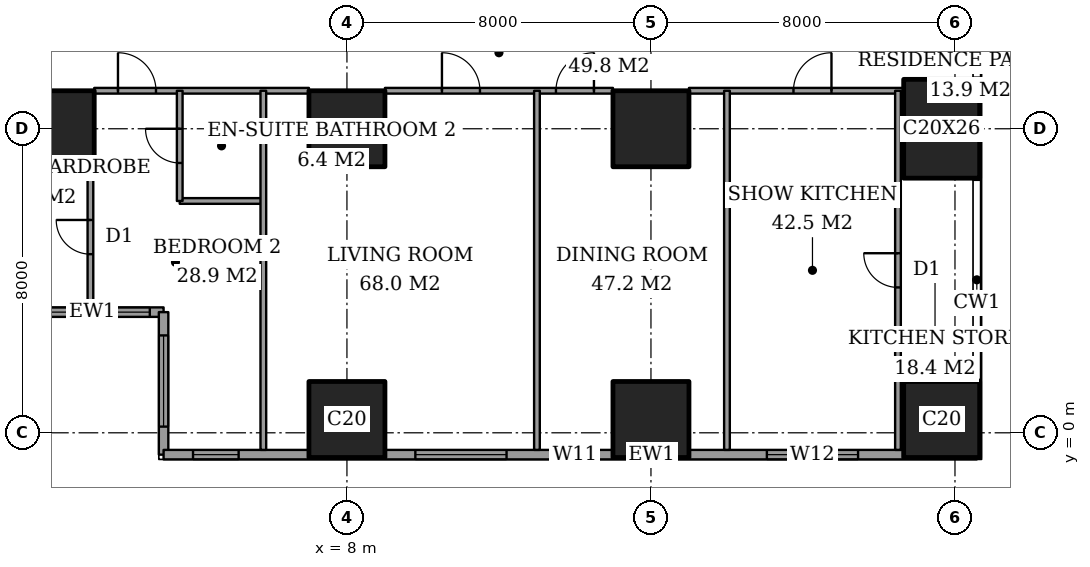
"""IFC4 building model, lengths in metres.
Left out: names, types, materials, properties, quantities, classifications, styles, units other than length and angle.
Written with IfcOpenShell. Run it as: python <this file> out.ifc"""

import sys

from ifc_helpers import new_model, si_unit, direction, frame, frame_2d, origin, origin_2d, place, context, subcontext, project, spatial, rectangle, extrude, element, fill, save


model = new_model("IFC4")
c1 = context("Model", 3, precision=1e-05, world=origin(), true_north=direction((0.0, 1.0)))
c2 = subcontext(c1, "Body", "Model", "MODEL_VIEW")
j1 = project(units=[si_unit("LENGTHUNIT", "METRE"), si_unit("PLANEANGLEUNIT", "RADIAN")], contexts=[c1])
p1 = place(None, origin())
s1 = spatial("IfcSite", under=j1, at=p1, CompositionType="ELEMENT")
p2 = place(p1, origin())
s2 = spatial("IfcBuilding", under=s1, at=p2, CompositionType="ELEMENT")
p3 = place(p2, frame((0.0, 0.0, 150.2)))
s3 = spatial("IfcBuildingStorey", under=s2, at=p3, CompositionType="ELEMENT", Elevation=150.2)
for number, where, z_axis, x_axis in (
    (1, (0.35, 8.0, 0.0), (0.0, 0.0, 1.0), (1.0, 0.0, 0.0)),
    (2, (8.0, 0.35, 0.0), (0.0, 0.0, 1.0), (1.0, 0.0, 0.0)),
    (3, (8.0, 8.0, 0.0), (0.0, 0.0, 1.0), (1.0, 0.0, 0.0)),
    (4, (16.0, 0.35, 0.0), (0.0, 0.0, 1.0), (1.0, 0.0, 0.0)),
    (5, (16.0, 8.0, 0.0), (0.0, 0.0, 1.0), (1.0, 0.0, 0.0)),
    (6, (23.65, 0.35, 0.0), (0.0, 0.0, 1.0), (1.0, 0.0, 0.0)),
):
    element("IfcColumn", number, at=place(p3, frame(where, z_axis=z_axis, x_axis=x_axis)), inside=s3, PredefinedType="COLUMN", context=c2, shape_type="SweptSolid", body=[
        extrude(rectangle(XDim=2.0, YDim=2.0, at=origin_2d()), origin(), (0.0, 0.0, 1.0), 3.6),
    ])
p4 = place(p3, frame((23.65, 8.0, 0.0), z_axis=(0.0, 0.0, 1.0), x_axis=(1.0, 0.0, 0.0)))
e7 = element("IfcColumn", 7, at=p4, inside=s3, PredefinedType="COLUMN", context=c2, shape_type="SweptSolid", body=[
    extrude(rectangle(XDim=2.0, YDim=2.6, at=origin_2d()), origin(), (0.0, 0.0, 1.0), 3.6),
])
p5 = place(p3, frame((-0.575, 3.175, 0.0), z_axis=(0.0, 0.0, 1.0), x_axis=(1.0, 0.0, 0.0)))
e8 = element("IfcWall", 8, at=p5, inside=s3, PredefinedType="SOLIDWALL", context=c2, shape_type="SweptSolid", body=[
    extrude(rectangle(XDim=3.75, YDim=0.25, at=frame_2d((1.875, 0.0))), origin(), (0.0, 0.0, 1.0), 3.6),
])
p6 = place(p5, frame((0.45, 0.0, 0.4)))
e9 = element("IfcOpeningElement", 9, at=p6, cuts=e8, PredefinedType="OPENING", context=c2, shape_type="SweptSolid", body=[
    extrude(rectangle(XDim=1.2, YDim=2.2, at=frame_2d((0.6, 1.1))), frame((0.0, 0.135, 0.0), z_axis=(0.0, -1.0, 0.0), x_axis=(1.0, 0.0, 0.0)), (0.0, 0.0, 1.0), 0.27),
])
p7 = place(p5, frame((2.188, 0.0, 0.4)))
e10 = element("IfcOpeningElement", 10, at=p7, cuts=e8, PredefinedType="OPENING", context=c2, shape_type="SweptSolid", body=[
    extrude(rectangle(XDim=1.2, YDim=2.2, at=frame_2d((0.6, 1.1))), frame((0.0, 0.135, 0.0), z_axis=(0.0, -1.0, 0.0), x_axis=(1.0, 0.0, 0.0)), (0.0, 0.0, 1.0), 0.27),
])
p8 = place(p3, frame((3.175, 3.175, 0.0), z_axis=(0.0, 0.0, 1.0), x_axis=(0.0, -1.0, 0.0)))
e11 = element("IfcWall", 11, at=p8, inside=s3, PredefinedType="SOLIDWALL", context=c2, shape_type="SweptSolid", body=[
    extrude(rectangle(XDim=3.75, YDim=0.25, at=frame_2d((1.875, 0.0))), origin(), (0.0, 0.0, 1.0), 3.6),
])
p9 = place(p8, frame((0.613, 0.0, 0.4)))
e12 = element("IfcOpeningElement", 12, at=p9, cuts=e11, PredefinedType="OPENING", context=c2, shape_type="SweptSolid", body=[
    extrude(rectangle(XDim=2.4, YDim=2.2, at=frame_2d((1.2, 1.1))), frame((0.0, 0.135, 0.0), z_axis=(0.0, -1.0, 0.0), x_axis=(1.0, 0.0, 0.0)), (0.0, 0.0, 1.0), 0.27),
])
p10 = place(p3, frame((3.175, -0.575, 0.0), z_axis=(0.0, 0.0, 1.0), x_axis=(1.0, 0.0, 0.0)))
e13 = element("IfcWall", 13, at=p10, inside=s3, PredefinedType="SOLIDWALL", context=c2, shape_type="SweptSolid", body=[
    extrude(rectangle(XDim=21.4, YDim=0.25, at=frame_2d((10.7, 0.0))), origin(), (0.0, 0.0, 1.0), 3.6),
])
p11 = place(p10, frame((0.775, 0.0, 0.4)))
e14 = element("IfcOpeningElement", 14, at=p11, cuts=e13, PredefinedType="OPENING", context=c2, shape_type="SweptSolid", body=[
    extrude(rectangle(XDim=1.2, YDim=2.2, at=frame_2d((0.6, 1.1))), frame((0.0, 0.135, 0.0), z_axis=(0.0, -1.0, 0.0), x_axis=(1.0, 0.0, 0.0)), (0.0, 0.0, 1.0), 0.27),
])
p12 = place(p10, frame((6.625, 0.0, 0.4)))
e15 = element("IfcOpeningElement", 15, at=p12, cuts=e13, PredefinedType="OPENING", context=c2, shape_type="SweptSolid", body=[
    extrude(rectangle(XDim=2.4, YDim=2.2, at=frame_2d((1.2, 1.1))), frame((0.0, 0.135, 0.0), z_axis=(0.0, -1.0, 0.0), x_axis=(1.0, 0.0, 0.0)), (0.0, 0.0, 1.0), 0.27),
])
p13 = place(p10, frame((10.225, 0.0, 0.4)))
e16 = element("IfcOpeningElement", 16, at=p13, cuts=e13, PredefinedType="OPENING", context=c2, shape_type="SweptSolid", body=[
    extrude(rectangle(XDim=1.2, YDim=2.2, at=frame_2d((0.6, 1.1))), frame((0.0, 0.135, 0.0), z_axis=(0.0, -1.0, 0.0), x_axis=(1.0, 0.0, 0.0)), (0.0, 0.0, 1.0), 0.27),
])
p14 = place(p10, frame((15.875, 0.0, 0.4)))
e17 = element("IfcOpeningElement", 17, at=p14, cuts=e13, PredefinedType="OPENING", context=c2, shape_type="SweptSolid", body=[
    extrude(rectangle(XDim=2.4, YDim=2.2, at=frame_2d((1.2, 1.1))), frame((0.0, 0.135, 0.0), z_axis=(0.0, -1.0, 0.0), x_axis=(1.0, 0.0, 0.0)), (0.0, 0.0, 1.0), 0.27),
])
p15 = place(p3, frame((3.6, 6.1, 0.0), z_axis=(0.0, 0.0, 1.0), x_axis=(1.0, 0.0, 0.0)))
e18 = element("IfcWall", 18, at=p15, inside=s3, PredefinedType="PARTITIONING", context=c2, shape_type="SweptSolid", body=[
    extrude(rectangle(XDim=2.2, YDim=0.15, at=frame_2d((1.1, 0.0))), origin(), (0.0, 0.0, 1.0), 3.35),
])
p16 = place(p3, frame((1.35, 9.0, 0.0), z_axis=(0.0, 0.0, 1.0), x_axis=(1.0, 0.0, 0.0)))
e19 = element("IfcWall", 19, at=p16, inside=s3, PredefinedType="PARTITIONING", context=c2, shape_type="SweptSolid", body=[
    extrude(rectangle(XDim=5.65, YDim=0.15, at=frame_2d((2.825, 0.0))), origin(), (0.0, 0.0, 1.0), 3.35),
])
p17 = place(p16, frame((0.625, 0.0, 0.0)))
e20 = element("IfcOpeningElement", 20, at=p17, cuts=e19, PredefinedType="OPENING", context=c2, shape_type="SweptSolid", body=[
    extrude(rectangle(XDim=1.0, YDim=2.1, at=frame_2d((0.5, 1.05))), frame((0.0, 0.085, 0.0), z_axis=(0.0, -1.0, 0.0), x_axis=(1.0, 0.0, 0.0)), (0.0, 0.0, 1.0), 0.17),
])
p18 = place(p3, frame((9.0, 9.0, 0.0), z_axis=(0.0, 0.0, 1.0), x_axis=(1.0, 0.0, 0.0)))
e21 = element("IfcWall", 21, at=p18, inside=s3, PredefinedType="PARTITIONING", context=c2, shape_type="SweptSolid", body=[
    extrude(rectangle(XDim=6.0, YDim=0.15, at=frame_2d((3.0, 0.0))), origin(), (0.0, 0.0, 1.0), 3.35),
])
p19 = place(p18, frame((1.5, 0.0, 0.0)))
e22 = element("IfcOpeningElement", 22, at=p19, cuts=e21, PredefinedType="OPENING", context=c2, shape_type="SweptSolid", body=[
    extrude(rectangle(XDim=1.0, YDim=2.1, at=frame_2d((0.5, 1.05))), frame((0.0, 0.085, 0.0), z_axis=(0.0, -1.0, 0.0), x_axis=(1.0, 0.0, 0.0)), (0.0, 0.0, 1.0), 0.17),
])
p20 = place(p18, frame((4.5, 0.0, 0.0)))
e23 = element("IfcOpeningElement", 23, at=p20, cuts=e21, PredefinedType="OPENING", context=c2, shape_type="SweptSolid", body=[
    extrude(rectangle(XDim=1.0, YDim=2.1, at=frame_2d((0.5, 1.05))), frame((0.0, 0.085, 0.0), z_axis=(0.0, -1.0, 0.0), x_axis=(1.0, 0.0, 0.0)), (0.0, 0.0, 1.0), 0.17),
])
p21 = place(p3, frame((17.0, 9.0, 0.0), z_axis=(0.0, 0.0, 1.0), x_axis=(1.0, 0.0, 0.0)))
e24 = element("IfcWall", 24, at=p21, inside=s3, PredefinedType="PARTITIONING", context=c2, shape_type="SweptSolid", body=[
    extrude(rectangle(XDim=5.65, YDim=0.15, at=frame_2d((2.825, 0.0))), origin(), (0.0, 0.0, 1.0), 3.35),
])
p22 = place(p21, frame((2.75, 0.0, 0.0)))
e25 = element("IfcOpeningElement", 25, at=p22, cuts=e24, PredefinedType="OPENING", context=c2, shape_type="SweptSolid", body=[
    extrude(rectangle(XDim=1.0, YDim=2.1, at=frame_2d((0.5, 1.05))), frame((0.0, 0.085, 0.0), z_axis=(0.0, -1.0, 0.0), x_axis=(1.0, 0.0, 0.0)), (0.0, 0.0, 1.0), 0.17),
])
p23 = place(p3, frame((1.25, 3.3, 0.0), z_axis=(0.0, 0.0, 1.0), x_axis=(0.0, 1.0, 0.0)))
e26 = element("IfcWall", 26, at=p23, inside=s3, PredefinedType="PARTITIONING", context=c2, shape_type="SweptSolid", body=[
    extrude(rectangle(XDim=3.7, YDim=0.15, at=frame_2d((1.85, 0.0))), origin(), (0.0, 0.0, 1.0), 3.35),
])
p24 = place(p23, frame((1.4, 0.0, 0.0)))
e27 = element("IfcOpeningElement", 27, at=p24, cuts=e26, PredefinedType="OPENING", context=c2, shape_type="SweptSolid", body=[
    extrude(rectangle(XDim=0.9, YDim=2.1, at=frame_2d((0.45, 1.05))), frame((0.0, 0.085, 0.0), z_axis=(0.0, -1.0, 0.0), x_axis=(1.0, 0.0, 0.0)), (0.0, 0.0, 1.0), 0.17),
])
p25 = place(p3, frame((3.6, 6.1, 0.0), z_axis=(0.0, 0.0, 1.0), x_axis=(0.0, 1.0, 0.0)))
e28 = element("IfcWall", 28, at=p25, inside=s3, PredefinedType="PARTITIONING", context=c2, shape_type="SweptSolid", body=[
    extrude(rectangle(XDim=2.9, YDim=0.15, at=frame_2d((1.45, 0.0))), origin(), (0.0, 0.0, 1.0), 3.35),
])
p26 = place(p25, frame((1.0, 0.0, 0.0)))
e29 = element("IfcOpeningElement", 29, at=p26, cuts=e28, PredefinedType="OPENING", context=c2, shape_type="SweptSolid", body=[
    extrude(rectangle(XDim=0.9, YDim=2.1, at=frame_2d((0.45, 1.05))), frame((0.0, 0.085, 0.0), z_axis=(0.0, -1.0, 0.0), x_axis=(1.0, 0.0, 0.0)), (0.0, 0.0, 1.0), 0.17),
])
for number, where, z_axis, x_axis in (
    (30, (5.8, -0.45, 0.0), (0.0, 0.0, 1.0), (0.0, 1.0, 0.0)),
    (31, (13.0, -0.45, 0.0), (0.0, 0.0, 1.0), (0.0, 1.0, 0.0)),
    (32, (18.0, -0.45, 0.0), (0.0, 0.0, 1.0), (0.0, 1.0, 0.0)),
):
    element("IfcWall", number, at=place(p3, frame(where, z_axis=z_axis, x_axis=x_axis)), inside=s3, PredefinedType="PARTITIONING", context=c2, shape_type="SweptSolid", body=[
        extrude(rectangle(XDim=9.45, YDim=0.15, at=frame_2d((4.725, 0.0))), origin(), (0.0, 0.0, 1.0), 3.35),
    ])
p27 = place(p3, frame((22.5, -0.45, 0.0), z_axis=(0.0, 0.0, 1.0), x_axis=(0.0, 1.0, 0.0)))
e33 = element("IfcWall", 33, at=p27, inside=s3, PredefinedType="PARTITIONING", context=c2, shape_type="SweptSolid", body=[
    extrude(rectangle(XDim=9.45, YDim=0.15, at=frame_2d((4.725, 0.0))), origin(), (0.0, 0.0, 1.0), 3.35),
])
p28 = place(p27, frame((4.275, 0.0, 0.0)))
e34 = element("IfcOpeningElement", 34, at=p28, cuts=e33, PredefinedType="OPENING", context=c2, shape_type="SweptSolid", body=[
    extrude(rectangle(XDim=0.9, YDim=2.1, at=frame_2d((0.45, 1.05))), frame((0.0, 0.085, 0.0), z_axis=(0.0, -1.0, 0.0), x_axis=(1.0, 0.0, 0.0)), (0.0, 0.0, 1.0), 0.17),
])
p29 = place(p6, origin())
e35 = element("IfcWindow", 35, at=p29, inside=s3, PartitioningType="SINGLE_PANEL", PredefinedType="WINDOW", context=c2, shape_type="SweptSolid", body=[
    extrude(rectangle(XDim=1.2, YDim=2.2, at=frame_2d((0.6, 1.1))), frame((0.0, 0.03, 0.0), z_axis=(0.0, -1.0, 0.0), x_axis=(1.0, 0.0, 0.0)), (0.0, 0.0, 1.0), 0.06),
])
fill(e9, e35)
p30 = place(p7, origin())
e36 = element("IfcWindow", 36, at=p30, inside=s3, PartitioningType="SINGLE_PANEL", PredefinedType="WINDOW", context=c2, shape_type="SweptSolid", body=[
    extrude(rectangle(XDim=1.2, YDim=2.2, at=frame_2d((0.6, 1.1))), frame((0.0, 0.03, 0.0), z_axis=(0.0, -1.0, 0.0), x_axis=(1.0, 0.0, 0.0)), (0.0, 0.0, 1.0), 0.06),
])
fill(e10, e36)
p31 = place(p9, origin())
e37 = element("IfcWindow", 37, at=p31, inside=s3, PartitioningType="SINGLE_PANEL", PredefinedType="WINDOW", context=c2, shape_type="SweptSolid", body=[
    extrude(rectangle(XDim=2.4, YDim=2.2, at=frame_2d((1.2, 1.1))), frame((0.0, 0.03, 0.0), z_axis=(0.0, -1.0, 0.0), x_axis=(1.0, 0.0, 0.0)), (0.0, 0.0, 1.0), 0.06),
])
fill(e12, e37)
p32 = place(p11, origin())
e38 = element("IfcWindow", 38, at=p32, inside=s3, PartitioningType="SINGLE_PANEL", PredefinedType="WINDOW", context=c2, shape_type="SweptSolid", body=[
    extrude(rectangle(XDim=1.2, YDim=2.2, at=frame_2d((0.6, 1.1))), frame((0.0, 0.03, 0.0), z_axis=(0.0, -1.0, 0.0), x_axis=(1.0, 0.0, 0.0)), (0.0, 0.0, 1.0), 0.06),
])
fill(e14, e38)
p33 = place(p12, origin())
e39 = element("IfcWindow", 39, at=p33, inside=s3, PartitioningType="SINGLE_PANEL", PredefinedType="WINDOW", context=c2, shape_type="SweptSolid", body=[
    extrude(rectangle(XDim=2.4, YDim=2.2, at=frame_2d((1.2, 1.1))), frame((0.0, 0.03, 0.0), z_axis=(0.0, -1.0, 0.0), x_axis=(1.0, 0.0, 0.0)), (0.0, 0.0, 1.0), 0.06),
])
fill(e15, e39)
p34 = place(p13, origin())
e40 = element("IfcWindow", 40, at=p34, inside=s3, PartitioningType="SINGLE_PANEL", PredefinedType="WINDOW", context=c2, shape_type="SweptSolid", body=[
    extrude(rectangle(XDim=1.2, YDim=2.2, at=frame_2d((0.6, 1.1))), frame((0.0, 0.03, 0.0), z_axis=(0.0, -1.0, 0.0), x_axis=(1.0, 0.0, 0.0)), (0.0, 0.0, 1.0), 0.06),
])
fill(e16, e40)
p35 = place(p14, origin())
e41 = element("IfcWindow", 41, at=p35, inside=s3, PartitioningType="SINGLE_PANEL", PredefinedType="WINDOW", context=c2, shape_type="SweptSolid", body=[
    extrude(rectangle(XDim=2.4, YDim=2.2, at=frame_2d((1.2, 1.1))), frame((0.0, 0.03, 0.0), z_axis=(0.0, -1.0, 0.0), x_axis=(1.0, 0.0, 0.0)), (0.0, 0.0, 1.0), 0.06),
])
fill(e17, e41)
p36 = place(p24, origin())
e42 = element("IfcDoor", 42, at=p36, inside=s3, OperationType="SINGLE_SWING_LEFT", PredefinedType="DOOR", context=c2, shape_type="SweptSolid", body=[
    extrude(rectangle(XDim=0.9, YDim=2.1, at=frame_2d((0.45, 1.05))), frame((0.0, 0.025, 0.0), z_axis=(0.0, -1.0, 0.0), x_axis=(1.0, 0.0, 0.0)), (0.0, 0.0, 1.0), 0.05),
])
fill(e27, e42)
p37 = place(p26, origin())
e43 = element("IfcDoor", 43, at=p37, inside=s3, OperationType="SINGLE_SWING_LEFT", PredefinedType="DOOR", context=c2, shape_type="SweptSolid", body=[
    extrude(rectangle(XDim=0.9, YDim=2.1, at=frame_2d((0.45, 1.05))), frame((0.0, 0.025, 0.0), z_axis=(0.0, -1.0, 0.0), x_axis=(1.0, 0.0, 0.0)), (0.0, 0.0, 1.0), 0.05),
])
fill(e29, e43)
p38 = place(p17, origin())
e44 = element("IfcDoor", 44, at=p38, inside=s3, OperationType="SINGLE_SWING_RIGHT", PredefinedType="DOOR", context=c2, shape_type="SweptSolid", body=[
    extrude(rectangle(XDim=1.0, YDim=2.1, at=frame_2d((0.5, 1.05))), frame((0.0, 0.025, 0.0), z_axis=(0.0, -1.0, 0.0), x_axis=(1.0, 0.0, 0.0)), (0.0, 0.0, 1.0), 0.05),
])
fill(e20, e44)
p39 = place(p19, origin())
e45 = element("IfcDoor", 45, at=p39, inside=s3, OperationType="SINGLE_SWING_RIGHT", PredefinedType="DOOR", context=c2, shape_type="SweptSolid", body=[
    extrude(rectangle(XDim=1.0, YDim=2.1, at=frame_2d((0.5, 1.05))), frame((0.0, 0.025, 0.0), z_axis=(0.0, -1.0, 0.0), x_axis=(1.0, 0.0, 0.0)), (0.0, 0.0, 1.0), 0.05),
])
fill(e22, e45)
p40 = place(p20, origin())
e46 = element("IfcDoor", 46, at=p40, inside=s3, OperationType="SINGLE_SWING_LEFT", PredefinedType="DOOR", context=c2, shape_type="SweptSolid", body=[
    extrude(rectangle(XDim=1.0, YDim=2.1, at=frame_2d((0.5, 1.05))), frame((0.0, 0.025, 0.0), z_axis=(0.0, -1.0, 0.0), x_axis=(1.0, 0.0, 0.0)), (0.0, 0.0, 1.0), 0.05),
])
fill(e23, e46)
p41 = place(p22, origin())
e47 = element("IfcDoor", 47, at=p41, inside=s3, OperationType="SINGLE_SWING_LEFT", PredefinedType="DOOR", context=c2, shape_type="SweptSolid", body=[
    extrude(rectangle(XDim=1.0, YDim=2.1, at=frame_2d((0.5, 1.05))), frame((0.0, 0.025, 0.0), z_axis=(0.0, -1.0, 0.0), x_axis=(1.0, 0.0, 0.0)), (0.0, 0.0, 1.0), 0.05),
])
fill(e25, e47)
p42 = place(p28, origin())
e48 = element("IfcDoor", 48, at=p42, inside=s3, OperationType="SINGLE_SWING_LEFT", PredefinedType="DOOR", context=c2, shape_type="SweptSolid", body=[
    extrude(rectangle(XDim=0.9, YDim=2.1, at=frame_2d((0.45, 1.05))), frame((0.0, 0.025, 0.0), z_axis=(0.0, -1.0, 0.0), x_axis=(1.0, 0.0, 0.0)), (0.0, 0.0, 1.0), 0.05),
])
fill(e34, e48)
save(model, sys.argv[1])
